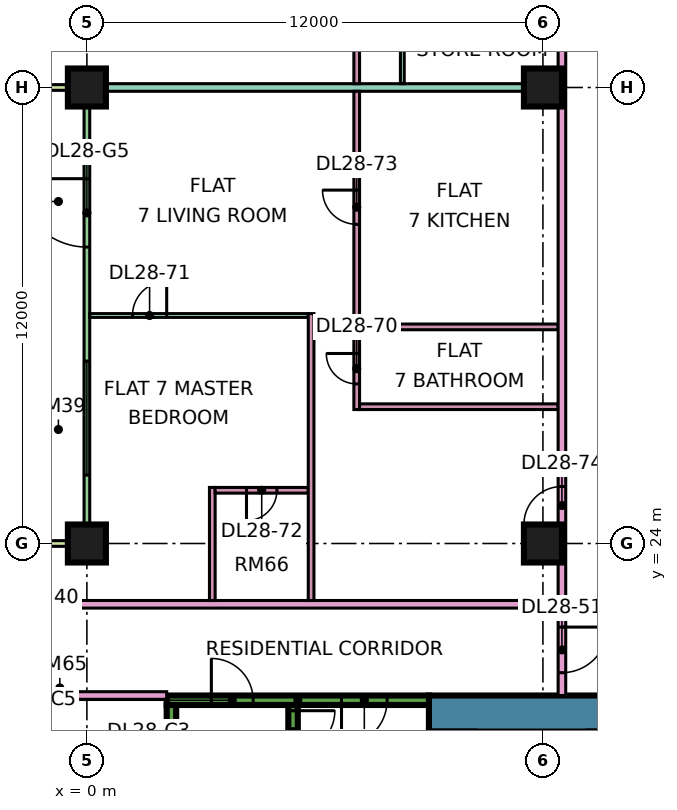
"""IFC4 building model, lengths in metres.
Left out: names, types, materials, properties, quantities, classifications, styles, units other than length and angle.
Written with IfcOpenShell. Run it as: python <this file> out.ifc"""

import sys

from ifc_helpers import new_model, si_unit, direction, frame, frame_2d, origin, origin_2d, place, context, subcontext, project, spatial, rectangle, extrude, element, fill, save


model = new_model("IFC4")
c1 = context("Model", 3, precision=1e-05, world=origin(), true_north=direction((0.0, 1.0)))
c2 = subcontext(c1, "Body", "Model", "MODEL_VIEW")
j1 = project(units=[si_unit("LENGTHUNIT", "METRE"), si_unit("PLANEANGLEUNIT", "RADIAN")], contexts=[c1])
p1 = place(None, origin())
s1 = spatial("IfcSite", under=j1, at=p1, CompositionType="ELEMENT")
p2 = place(p1, origin())
s2 = spatial("IfcBuilding", under=s1, at=p2, CompositionType="ELEMENT")
p3 = place(p2, frame((0.0, 0.0, 121.9)))
s3 = spatial("IfcBuildingStorey", under=s2, at=p3, CompositionType="ELEMENT", Elevation=121.9)
p4 = place(p3, frame((0.0, 24.0, 0.0), z_axis=(0.0, 0.0, 1.0), x_axis=(1.0, 0.0, 0.0)))
e1 = element("IfcColumn", 1, at=p4, inside=s3, PredefinedType="COLUMN", context=c2, shape_type="SweptSolid", body=[
    extrude(rectangle(XDim=1.0, YDim=1.0, at=origin_2d()), origin(), (0.0, 0.0, 1.0), 3.75),
])
p5 = place(p3, frame((0.0, 36.0, 0.0), z_axis=(0.0, 0.0, 1.0), x_axis=(1.0, 0.0, 0.0)))
e2 = element("IfcColumn", 2, at=p5, inside=s3, PredefinedType="COLUMN", context=c2, shape_type="SweptSolid", body=[
    extrude(rectangle(XDim=1.0, YDim=1.0, at=origin_2d()), origin(), (0.0, 0.0, 1.0), 3.75),
])
for number, where, z_axis, x_axis in (
    (3, (12.0, 24.0, 0.0), (0.0, 0.0, 1.0), (1.0, 0.0, 0.0)),
    (4, (12.0, 36.0, 0.0), (0.0, 0.0, 1.0), (1.0, 0.0, 0.0)),
):
    element("IfcColumn", number, at=place(p3, frame(where, z_axis=z_axis, x_axis=x_axis)), inside=s3, PredefinedType="COLUMN", context=c2, shape_type="SweptSolid", body=[
        extrude(rectangle(XDim=1.0, YDim=1.0, at=origin_2d()), origin(), (0.0, 0.0, 1.0), 3.75),
    ])
p6 = place(p3, frame((9.0, 19.525, 0.0), z_axis=(0.0, 0.0, 1.0), x_axis=(1.0, 0.0, 0.0)))
e5 = element("IfcWall", 5, at=p6, inside=s3, PredefinedType="SHEAR", context=c2, shape_type="SweptSolid", body=[
    extrude(rectangle(XDim=25.0, YDim=0.95, at=frame_2d((12.5, 0.0))), origin(), (0.0, 0.0, 1.0), 3.75),
])
p7 = place(p6, frame((19.1, 0.0, 0.0)))
e6 = element("IfcOpeningElement", 6, at=p7, cuts=e5, PredefinedType="OPENING", context=c2, shape_type="SweptSolid", body=[
    extrude(rectangle(XDim=1.8, YDim=2.4, at=frame_2d((0.9, 1.2))), frame((0.0, 0.485, 0.0), z_axis=(0.0, -1.0, 0.0), x_axis=(1.0, 0.0, 0.0)), (0.0, 0.0, 1.0), 0.97),
])
p8 = place(p3, frame((2.1, 19.875, 0.0), z_axis=(0.0, 0.0, 1.0), x_axis=(1.0, 0.0, 0.0)))
e7 = element("IfcWall", 7, at=p8, inside=s3, PredefinedType="SHEAR", context=c2, shape_type="SweptSolid", body=[
    extrude(rectangle(XDim=6.9, YDim=0.25, at=frame_2d((3.45, 0.0))), origin(), (0.0, 0.0, 1.0), 3.75),
])
p9 = place(p8, frame((1.175, 0.0, 0.0)))
e8 = element("IfcOpeningElement", 8, at=p9, cuts=e7, PredefinedType="OPENING", context=c2, shape_type="SweptSolid", body=[
    extrude(rectangle(XDim=1.1, YDim=2.2, at=frame_2d((0.55, 1.1))), frame((0.0, 0.135, 0.0), z_axis=(0.0, -1.0, 0.0), x_axis=(1.0, 0.0, 0.0)), (0.0, 0.0, 1.0), 0.27),
])
p10 = place(p8, frame((4.6, 0.0, 0.0)))
e9 = element("IfcOpeningElement", 9, at=p10, cuts=e7, PredefinedType="OPENING", context=c2, shape_type="SweptSolid", body=[
    extrude(rectangle(XDim=1.2, YDim=2.2, at=frame_2d((0.6, 1.1))), frame((0.0, 0.135, 0.0), z_axis=(0.0, -1.0, 0.0), x_axis=(1.0, 0.0, 0.0)), (0.0, 0.0, 1.0), 0.27),
])
p11 = place(p3, frame((2.225, 13.25, 0.0), z_axis=(0.0, 0.0, 1.0), x_axis=(0.0, 1.0, 0.0)))
e10 = element("IfcWall", 10, at=p11, inside=s3, PredefinedType="SHEAR", context=c2, shape_type="SweptSolid", body=[
    extrude(rectangle(XDim=6.5, YDim=0.25, at=frame_2d((3.25, 0.0))), origin(), (0.0, 0.0, 1.0), 3.75),
])
p12 = place(p3, frame((5.425, 13.25, 0.0), z_axis=(0.0, 0.0, 1.0), x_axis=(0.0, 1.0, 0.0)))
e11 = element("IfcWall", 11, at=p12, inside=s3, PredefinedType="SHEAR", context=c2, shape_type="SweptSolid", body=[
    extrude(rectangle(XDim=6.5, YDim=0.25, at=frame_2d((3.25, 0.0))), origin(), (0.0, 0.0, 1.0), 3.75),
])
p13 = place(p12, frame((5.25, 0.0, 0.0)))
e12 = element("IfcOpeningElement", 12, at=p13, cuts=e11, PredefinedType="OPENING", context=c2, shape_type="SweptSolid", body=[
    extrude(rectangle(XDim=1.1, YDim=2.2, at=frame_2d((0.55, 1.1))), frame((0.0, 0.135, 0.0), z_axis=(0.0, -1.0, 0.0), x_axis=(1.0, 0.0, 0.0)), (0.0, 0.0, 1.0), 0.27),
])
p14 = place(p3, frame((0.0, 35.925, 0.0), z_axis=(0.0, 0.0, 1.0), x_axis=(0.0, -1.0, 0.0)))
e13 = element("IfcWall", 13, at=p14, inside=s3, PredefinedType="SOLIDWALL", context=c2, shape_type="SweptSolid", body=[
    extrude(rectangle(XDim=11.85, YDim=0.15, at=frame_2d((5.925, 0.0))), origin(), (0.0, 0.0, 1.0), 3.35),
])
p15 = place(p14, frame((2.325, 0.0, 0.0)))
e14 = element("IfcOpeningElement", 14, at=p15, cuts=e13, PredefinedType="OPENING", context=c2, shape_type="SweptSolid", body=[
    extrude(rectangle(XDim=1.8, YDim=2.4, at=frame_2d((0.9, 1.2))), frame((0.0, 0.085, 0.0), z_axis=(0.0, -1.0, 0.0), x_axis=(1.0, 0.0, 0.0)), (0.0, 0.0, 1.0), 0.17),
])
p16 = place(p14, frame((7.125, 0.0, 0.45)))
e15 = element("IfcOpeningElement", 15, at=p16, cuts=e13, PredefinedType="OPENING", context=c2, shape_type="SweptSolid", body=[
    extrude(rectangle(XDim=3.0, YDim=2.4, at=frame_2d((1.5, 1.2))), frame((0.0, 0.085, 0.0), z_axis=(0.0, -1.0, 0.0), x_axis=(1.0, 0.0, 0.0)), (0.0, 0.0, 1.0), 0.17),
])
for number, where, z_axis, x_axis in (
    (16, (-1.5, 36.0, 0.0), (0.0, 0.0, 1.0), (1.0, 0.0, 0.0)),
    (17, (-1.5, 24.0, 0.0), (0.0, 0.0, 1.0), (1.0, 0.0, 0.0)),
):
    element("IfcWall", number, at=place(p3, frame(where, z_axis=z_axis, x_axis=x_axis)), inside=s3, PredefinedType="SOLIDWALL", context=c2, shape_type="SweptSolid", body=[
        extrude(rectangle(XDim=1.5, YDim=0.15, at=frame_2d((0.75, 0.0))), origin(), (0.0, 0.0, 1.0), 3.35),
    ])
p17 = place(p3, frame((-1.35, 20.0, 0.0), z_axis=(0.0, 0.0, 1.0), x_axis=(1.0, 0.0, 0.0)))
e18 = element("IfcWall", 18, at=p17, inside=s3, PredefinedType="PARTITIONING", context=c2, shape_type="SweptSolid", body=[
    extrude(rectangle(XDim=3.45, YDim=0.2, at=frame_2d((1.725, 0.0))), origin(), (0.0, 0.0, 1.0), 3.35),
])
p18 = place(p3, frame((-1.35, 22.4, 0.0), z_axis=(0.0, 0.0, 1.0), x_axis=(1.0, 0.0, 0.0)))
e19 = element("IfcWall", 19, at=p18, inside=s3, PredefinedType="PARTITIONING", context=c2, shape_type="SweptSolid", body=[
    extrude(rectangle(XDim=13.75, YDim=0.2, at=frame_2d((6.875, 0.0))), origin(), (0.0, 0.0, 1.0), 3.35),
])
e20 = element("IfcWall", 20, at=p5, inside=s3, PredefinedType="PARTITIONING", context=c2, shape_type="SweptSolid", body=[
    extrude(rectangle(XDim=12.4, YDim=0.2, at=frame_2d((6.2, 0.0))), origin(), (0.0, 0.0, 1.0), 3.35),
])
p19 = place(p3, frame((0.074, 30.0, 0.0), z_axis=(0.0, 0.0, 1.0), x_axis=(1.0, 0.0, 0.0)))
e21 = element("IfcWall", 21, at=p19, inside=s3, PredefinedType="PARTITIONING", context=c2, shape_type="SweptSolid", body=[
    extrude(rectangle(XDim=5.751, YDim=0.1, at=frame_2d((2.875, 0.0))), origin(), (0.0, 0.0, 1.0), 3.35),
])
p20 = place(p19, frame((1.126, 0.0, 0.0)))
e22 = element("IfcOpeningElement", 22, at=p20, cuts=e21, PredefinedType="OPENING", context=c2, shape_type="SweptSolid", body=[
    extrude(rectangle(XDim=0.9, YDim=2.1, at=frame_2d((0.45, 1.05))), frame((0.0, 0.06, 0.0), z_axis=(0.0, -1.0, 0.0), x_axis=(1.0, 0.0, 0.0)), (0.0, 0.0, 1.0), 0.12),
])
p21 = place(p3, frame((3.3, 22.5, 0.0), z_axis=(0.0, 0.0, 1.0), x_axis=(0.0, 1.0, 0.0)))
e23 = element("IfcWall", 23, at=p21, inside=s3, PredefinedType="PARTITIONING", context=c2, shape_type="SweptSolid", body=[
    extrude(rectangle(XDim=2.975, YDim=0.15, at=frame_2d((1.488, 0.0))), origin(), (0.0, 0.0, 1.0), 3.35),
])
p22 = place(p3, frame((3.375, 25.4, 0.0), z_axis=(0.0, 0.0, 1.0), x_axis=(1.0, 0.0, 0.0)))
e24 = element("IfcWall", 24, at=p22, inside=s3, PredefinedType="PARTITIONING", context=c2, shape_type="SweptSolid", body=[
    extrude(rectangle(XDim=2.45, YDim=0.15, at=frame_2d((1.225, 0.0))), origin(), (0.0, 0.0, 1.0), 3.35),
])
p23 = place(p22, frame((0.825, 0.0, 0.0)))
e25 = element("IfcOpeningElement", 25, at=p23, cuts=e24, PredefinedType="OPENING", context=c2, shape_type="SweptSolid", body=[
    extrude(rectangle(XDim=0.8, YDim=2.1, at=frame_2d((0.4, 1.05))), frame((0.0, 0.085, 0.0), z_axis=(0.0, -1.0, 0.0), x_axis=(1.0, 0.0, 0.0)), (0.0, 0.0, 1.0), 0.17),
])
p24 = place(p3, frame((5.9, 22.5, 0.0), z_axis=(0.0, 0.0, 1.0), x_axis=(0.0, 1.0, 0.0)))
e26 = element("IfcWall", 26, at=p24, inside=s3, PredefinedType="PARTITIONING", context=c2, shape_type="SweptSolid", body=[
    extrude(rectangle(XDim=7.55, YDim=0.15, at=frame_2d((3.775, 0.0))), origin(), (0.0, 0.0, 1.0), 3.35),
])
p25 = place(p3, frame((7.1, 27.525, 0.0), z_axis=(0.0, 0.0, 1.0), x_axis=(0.0, 1.0, 0.0)))
e27 = element("IfcWall", 27, at=p25, inside=s3, PredefinedType="PARTITIONING", context=c2, shape_type="SweptSolid", body=[
    extrude(rectangle(XDim=8.375, YDim=0.15, at=frame_2d((4.188, 0.0))), origin(), (0.0, 0.0, 1.0), 3.35),
])
p26 = place(p25, frame((0.675, 0.0, 0.0)))
e28 = element("IfcOpeningElement", 28, at=p26, cuts=e27, PredefinedType="OPENING", context=c2, shape_type="SweptSolid", body=[
    extrude(rectangle(XDim=0.8, YDim=2.1, at=frame_2d((0.4, 1.05))), frame((0.0, 0.085, 0.0), z_axis=(0.0, -1.0, 0.0), x_axis=(1.0, 0.0, 0.0)), (0.0, 0.0, 1.0), 0.17),
])
p27 = place(p25, frame((4.875, 0.0, 0.0)))
e29 = element("IfcOpeningElement", 29, at=p27, cuts=e27, PredefinedType="OPENING", context=c2, shape_type="SweptSolid", body=[
    extrude(rectangle(XDim=0.9, YDim=2.1, at=frame_2d((0.45, 1.05))), frame((0.0, 0.085, 0.0), z_axis=(0.0, -1.0, 0.0), x_axis=(1.0, 0.0, 0.0)), (0.0, 0.0, 1.0), 0.17),
])
p28 = place(p3, frame((7.1, 36.1, 0.0), z_axis=(0.0, 0.0, 1.0), x_axis=(0.0, 1.0, 0.0)))
e30 = element("IfcWall", 30, at=p28, inside=s3, PredefinedType="PARTITIONING", context=c2, shape_type="SweptSolid", body=[
    extrude(rectangle(XDim=26.826, YDim=0.15, at=frame_2d((13.413, 0.0))), origin(), (0.0, 0.0, 1.0), 3.35),
])
p29 = place(p28, frame((0.95, 0.0, 0.0)))
e31 = element("IfcOpeningElement", 31, at=p29, cuts=e30, PredefinedType="OPENING", context=c2, shape_type="SweptSolid", body=[
    extrude(rectangle(XDim=0.9, YDim=2.1, at=frame_2d((0.45, 1.05))), frame((0.0, 0.085, 0.0), z_axis=(0.0, -1.0, 0.0), x_axis=(1.0, 0.0, 0.0)), (0.0, 0.0, 1.0), 0.17),
])
p30 = place(p28, frame((9.95, 0.0, 0.0)))
e32 = element("IfcOpeningElement", 32, at=p30, cuts=e30, PredefinedType="OPENING", context=c2, shape_type="SweptSolid", body=[
    extrude(rectangle(XDim=0.9, YDim=2.1, at=frame_2d((0.45, 1.05))), frame((0.0, 0.085, 0.0), z_axis=(0.0, -1.0, 0.0), x_axis=(1.0, 0.0, 0.0)), (0.0, 0.0, 1.0), 0.17),
])
p31 = place(p28, frame((6.95, 0.0, 0.0)))
e33 = element("IfcOpeningElement", 33, at=p31, cuts=e30, PredefinedType="OPENING", context=c2, shape_type="SweptSolid", body=[
    extrude(rectangle(XDim=0.9, YDim=2.1, at=frame_2d((0.45, 1.05))), frame((0.0, 0.085, 0.0), z_axis=(0.0, -1.0, 0.0), x_axis=(1.0, 0.0, 0.0)), (0.0, 0.0, 1.0), 0.17),
])
p32 = place(p28, frame((20.45, 0.0, 0.0)))
e34 = element("IfcOpeningElement", 34, at=p32, cuts=e30, PredefinedType="OPENING", context=c2, shape_type="SweptSolid", body=[
    extrude(rectangle(XDim=0.9, YDim=2.1, at=frame_2d((0.45, 1.05))), frame((0.0, 0.085, 0.0), z_axis=(0.0, -1.0, 0.0), x_axis=(1.0, 0.0, 0.0)), (0.0, 0.0, 1.0), 0.17),
])
p33 = place(p28, frame((25.8, 0.0, 0.0)))
e35 = element("IfcOpeningElement", 35, at=p33, cuts=e30, PredefinedType="OPENING", context=c2, shape_type="SweptSolid", body=[
    extrude(rectangle(XDim=0.8, YDim=2.1, at=frame_2d((0.4, 1.05))), frame((0.0, 0.085, 0.0), z_axis=(0.0, -1.0, 0.0), x_axis=(1.0, 0.0, 0.0)), (0.0, 0.0, 1.0), 0.17),
])
p34 = place(p28, frame((12.55, 0.0, 0.0)))
e36 = element("IfcOpeningElement", 36, at=p34, cuts=e30, PredefinedType="OPENING", context=c2, shape_type="SweptSolid", body=[
    extrude(rectangle(XDim=1.6, YDim=2.1, at=frame_2d((0.8, 1.05))), frame((0.0, 0.085, 0.0), z_axis=(0.0, -1.0, 0.0), x_axis=(1.0, 0.0, 0.0)), (0.0, 0.0, 1.0), 0.17),
])
p35 = place(p28, frame((15.95, 0.0, 0.0)))
e37 = element("IfcOpeningElement", 37, at=p35, cuts=e30, PredefinedType="OPENING", context=c2, shape_type="SweptSolid", body=[
    extrude(rectangle(XDim=0.9, YDim=2.1, at=frame_2d((0.45, 1.05))), frame((0.0, 0.085, 0.0), z_axis=(0.0, -1.0, 0.0), x_axis=(1.0, 0.0, 0.0)), (0.0, 0.0, 1.0), 0.17),
])
for number, where, z_axis, x_axis in (
    (38, (7.175, 27.6, 0.0), (0.0, 0.0, 1.0), (1.0, 0.0, 0.0)),
    (39, (7.175, 29.7, 0.0), (0.0, 0.0, 1.0), (1.0, 0.0, 0.0)),
):
    element("IfcWall", number, at=place(p3, frame(where, z_axis=z_axis, x_axis=x_axis)), inside=s3, PredefinedType="PARTITIONING", context=c2, shape_type="SweptSolid", body=[
        extrude(rectangle(XDim=5.225, YDim=0.15, at=frame_2d((2.612, 0.0))), origin(), (0.0, 0.0, 1.0), 3.35),
    ])
p36 = place(p3, frame((8.3, 36.1, 0.0), z_axis=(0.0, 0.0, 1.0), x_axis=(0.0, 1.0, 0.0)))
e40 = element("IfcWall", 40, at=p36, inside=s3, PredefinedType="PARTITIONING", context=c2, shape_type="SweptSolid", body=[
    extrude(rectangle(XDim=2.55, YDim=0.1, at=frame_2d((1.275, 0.0))), origin(), (0.0, 0.0, 1.0), 3.35),
])
p37 = place(p3, frame((12.5, 20.0, 0.0), z_axis=(0.0, 0.0, 1.0), x_axis=(0.0, 1.0, 0.0)))
e41 = element("IfcWall", 41, at=p37, inside=s3, PredefinedType="PARTITIONING", context=c2, shape_type="SweptSolid", body=[
    extrude(rectangle(XDim=43.0, YDim=0.2, at=frame_2d((21.5, 0.0))), origin(), (0.0, 0.0, 1.0), 3.35),
])
p38 = place(p37, frame((19.65, 0.0, 0.0)))
e42 = element("IfcOpeningElement", 42, at=p38, cuts=e41, PredefinedType="OPENING", context=c2, shape_type="SweptSolid", body=[
    extrude(rectangle(XDim=1.0, YDim=2.1, at=frame_2d((0.5, 1.05))), frame((0.0, 0.11, 0.0), z_axis=(0.0, -1.0, 0.0), x_axis=(1.0, 0.0, 0.0)), (0.0, 0.0, 1.0), 0.22),
])
p39 = place(p37, frame((0.6, 0.0, 0.0)))
e43 = element("IfcOpeningElement", 43, at=p39, cuts=e41, PredefinedType="OPENING", context=c2, shape_type="SweptSolid", body=[
    extrude(rectangle(XDim=1.2, YDim=2.1, at=frame_2d((0.6, 1.05))), frame((0.0, 0.11, 0.0), z_axis=(0.0, -1.0, 0.0), x_axis=(1.0, 0.0, 0.0)), (0.0, 0.0, 1.0), 0.22),
])
p40 = place(p37, frame((4.5, 0.0, 0.0)))
e44 = element("IfcOpeningElement", 44, at=p40, cuts=e41, PredefinedType="OPENING", context=c2, shape_type="SweptSolid", body=[
    extrude(rectangle(XDim=1.0, YDim=2.1, at=frame_2d((0.5, 1.05))), frame((0.0, 0.11, 0.0), z_axis=(0.0, -1.0, 0.0), x_axis=(1.0, 0.0, 0.0)), (0.0, 0.0, 1.0), 0.22),
])
p41 = place(p15, frame((1.8, 0.0, 0.0), z_axis=(0.0, 0.0, 1.0), x_axis=(-1.0, 0.0, 0.0)))
e45 = element("IfcDoor", 45, at=p41, inside=s3, OperationType="DOUBLE_DOOR_SINGLE_SWING", PredefinedType="DOOR", context=c2, shape_type="SweptSolid", body=[
    extrude(rectangle(XDim=1.8, YDim=2.4, at=frame_2d((0.9, 1.2))), frame((0.0, 0.025, 0.0), z_axis=(0.0, -1.0, 0.0), x_axis=(1.0, 0.0, 0.0)), (0.0, 0.0, 1.0), 0.05),
])
fill(e14, e45)
p42 = place(p16, origin())
e46 = element("IfcWindow", 46, at=p42, inside=s3, PartitioningType="SINGLE_PANEL", PredefinedType="WINDOW", context=c2, shape_type="SweptSolid", body=[
    extrude(rectangle(XDim=3.0, YDim=2.4, at=frame_2d((1.5, 1.2))), frame((0.0, 0.03, 0.0), z_axis=(0.0, -1.0, 0.0), x_axis=(1.0, 0.0, 0.0)), (0.0, 0.0, 1.0), 0.06),
])
fill(e15, e46)
p43 = place(p13, origin())
e47 = element("IfcDoor", 47, at=p43, inside=s3, OperationType="SINGLE_SWING_RIGHT", PredefinedType="DOOR", context=c2, shape_type="SweptSolid", body=[
    extrude(rectangle(XDim=1.1, YDim=2.2, at=frame_2d((0.55, 1.1))), frame((0.0, 0.025, 0.0), z_axis=(0.0, -1.0, 0.0), x_axis=(1.0, 0.0, 0.0)), (0.0, 0.0, 1.0), 0.05),
])
fill(e12, e47)
p44 = place(p9, origin())
e48 = element("IfcDoor", 48, at=p44, inside=s3, OperationType="SINGLE_SWING_LEFT", PredefinedType="DOOR", context=c2, shape_type="SweptSolid", body=[
    extrude(rectangle(XDim=1.1, YDim=2.2, at=frame_2d((0.55, 1.1))), frame((0.0, 0.025, 0.0), z_axis=(0.0, -1.0, 0.0), x_axis=(1.0, 0.0, 0.0)), (0.0, 0.0, 1.0), 0.05),
])
fill(e8, e48)
p45 = place(p10, frame((1.2, 0.0, 0.0), z_axis=(0.0, 0.0, 1.0), x_axis=(-1.0, 0.0, 0.0)))
e49 = element("IfcDoor", 49, at=p45, inside=s3, OperationType="SINGLE_SWING_LEFT", PredefinedType="DOOR", context=c2, shape_type="SweptSolid", body=[
    extrude(rectangle(XDim=1.2, YDim=2.2, at=frame_2d((0.6, 1.1))), frame((0.0, 0.025, 0.0), z_axis=(0.0, -1.0, 0.0), x_axis=(1.0, 0.0, 0.0)), (0.0, 0.0, 1.0), 0.05),
])
fill(e9, e49)
p46 = place(p39, origin())
e50 = element("IfcDoor", 50, at=p46, inside=s3, OperationType="SINGLE_SWING_RIGHT", PredefinedType="DOOR", context=c2, shape_type="SweptSolid", body=[
    extrude(rectangle(XDim=1.2, YDim=2.1, at=frame_2d((0.6, 1.05))), frame((0.0, 0.025, 0.0), z_axis=(0.0, -1.0, 0.0), x_axis=(1.0, 0.0, 0.0)), (0.0, 0.0, 1.0), 0.05),
])
fill(e43, e50)
p47 = place(p26, frame((0.8, 0.0, 0.0), z_axis=(0.0, 0.0, 1.0), x_axis=(-1.0, 0.0, 0.0)))
e51 = element("IfcDoor", 51, at=p47, inside=s3, OperationType="SINGLE_SWING_RIGHT", PredefinedType="DOOR", context=c2, shape_type="SweptSolid", body=[
    extrude(rectangle(XDim=0.8, YDim=2.1, at=frame_2d((0.4, 1.05))), frame((0.0, 0.025, 0.0), z_axis=(0.0, -1.0, 0.0), x_axis=(1.0, 0.0, 0.0)), (0.0, 0.0, 1.0), 0.05),
])
fill(e28, e51)
p48 = place(p20, frame((0.9, 0.0, 0.0), z_axis=(0.0, 0.0, 1.0), x_axis=(-1.0, 0.0, 0.0)))
e52 = element("IfcDoor", 52, at=p48, inside=s3, OperationType="SINGLE_SWING_RIGHT", PredefinedType="DOOR", context=c2, shape_type="SweptSolid", body=[
    extrude(rectangle(XDim=0.9, YDim=2.1, at=frame_2d((0.45, 1.05))), frame((0.0, 0.025, 0.0), z_axis=(0.0, -1.0, 0.0), x_axis=(1.0, 0.0, 0.0)), (0.0, 0.0, 1.0), 0.05),
])
fill(e22, e52)
p49 = place(p23, frame((0.8, 0.0, 0.0), z_axis=(0.0, 0.0, 1.0), x_axis=(-1.0, 0.0, 0.0)))
e53 = element("IfcDoor", 53, at=p49, inside=s3, OperationType="SINGLE_SWING_LEFT", PredefinedType="DOOR", context=c2, shape_type="SweptSolid", body=[
    extrude(rectangle(XDim=0.8, YDim=2.1, at=frame_2d((0.4, 1.05))), frame((0.0, 0.025, 0.0), z_axis=(0.0, -1.0, 0.0), x_axis=(1.0, 0.0, 0.0)), (0.0, 0.0, 1.0), 0.05),
])
fill(e25, e53)
p50 = place(p27, frame((0.9, 0.0, 0.0), z_axis=(0.0, 0.0, 1.0), x_axis=(-1.0, 0.0, 0.0)))
e54 = element("IfcDoor", 54, at=p50, inside=s3, OperationType="SINGLE_SWING_RIGHT", PredefinedType="DOOR", context=c2, shape_type="SweptSolid", body=[
    extrude(rectangle(XDim=0.9, YDim=2.1, at=frame_2d((0.45, 1.05))), frame((0.0, 0.025, 0.0), z_axis=(0.0, -1.0, 0.0), x_axis=(1.0, 0.0, 0.0)), (0.0, 0.0, 1.0), 0.05),
])
fill(e29, e54)
p51 = place(p40, origin())
e55 = element("IfcDoor", 55, at=p51, inside=s3, OperationType="SINGLE_SWING_LEFT", PredefinedType="DOOR", context=c2, shape_type="SweptSolid", body=[
    extrude(rectangle(XDim=1.0, YDim=2.1, at=frame_2d((0.5, 1.05))), frame((0.0, 0.025, 0.0), z_axis=(0.0, -1.0, 0.0), x_axis=(1.0, 0.0, 0.0)), (0.0, 0.0, 1.0), 0.05),
])
fill(e44, e55)
save(model, sys.argv[1])
